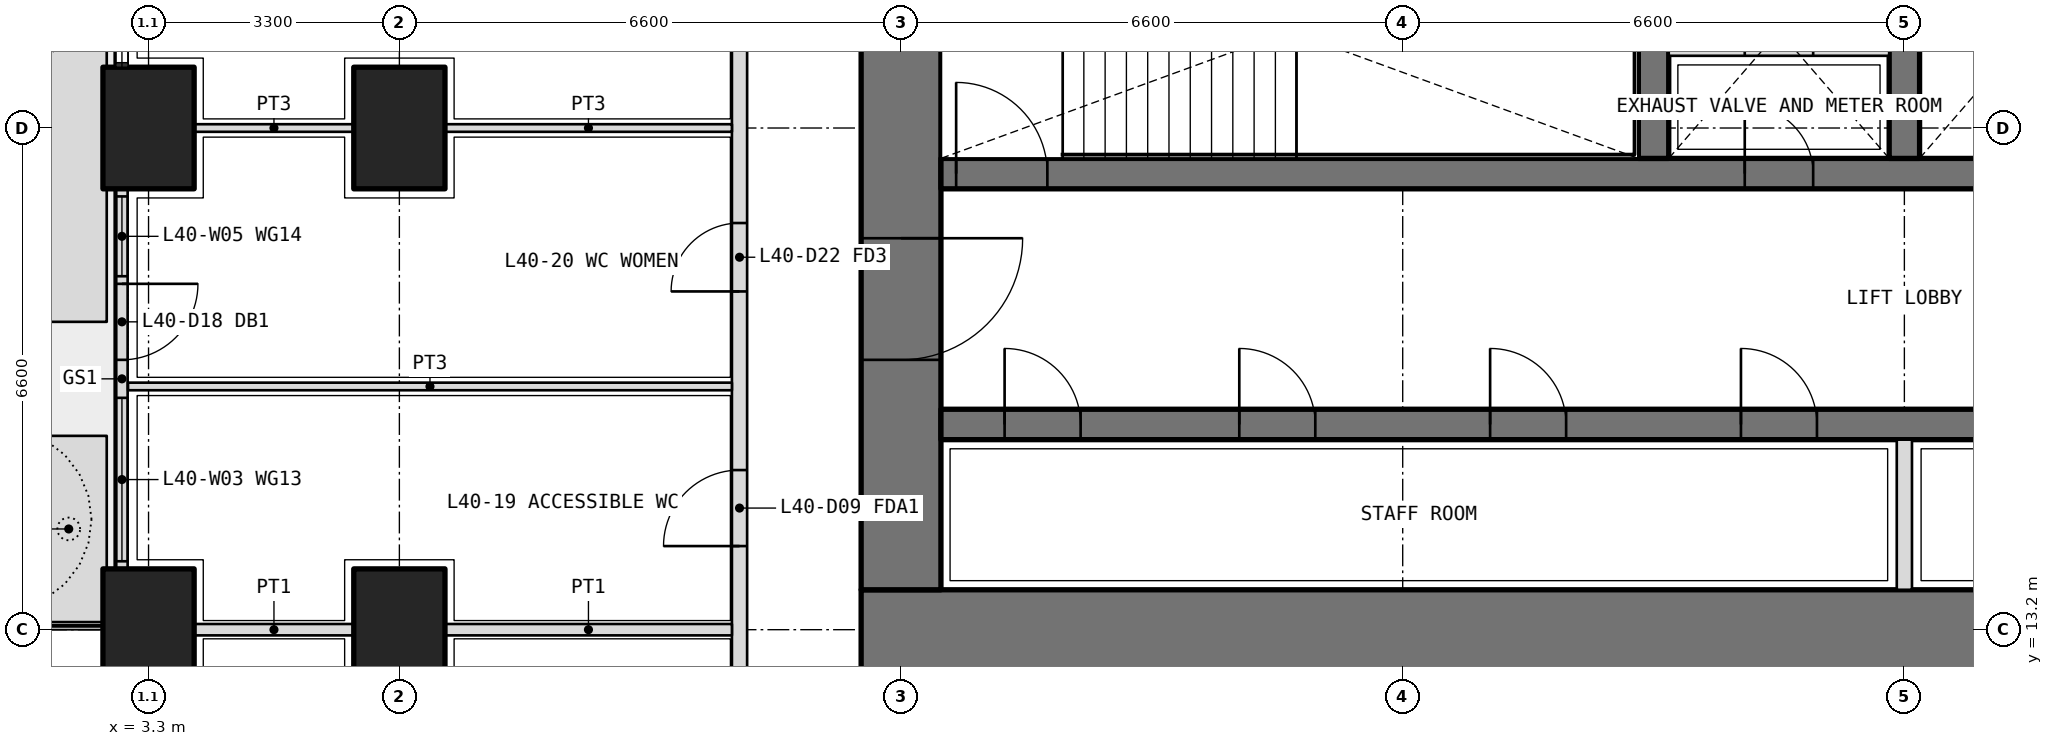
"""IFC4 building model, lengths in metres.
Left out: names, types, materials, properties, quantities, classifications, styles, units other than length and angle.
Written with IfcOpenShell. Run it as: python <this file> out.ifc"""

import sys

from ifc_helpers import new_model, si_unit, direction, frame, frame_2d, origin, origin_2d, place, context, subcontext, project, spatial, polyline, rectangle, outline, extrude, element, fill, save


model = new_model("IFC4")
c1 = context("Model", 3, precision=1e-05, world=origin(), true_north=direction((0.0, 1.0)))
c2 = subcontext(c1, "Body", "Model", "MODEL_VIEW")
j1 = project(units=[si_unit("LENGTHUNIT", "METRE"), si_unit("PLANEANGLEUNIT", "RADIAN")], contexts=[c1])
p1 = place(None, origin())
s1 = spatial("IfcSite", under=j1, at=p1, CompositionType="ELEMENT")
p2 = place(p1, origin())
s2 = spatial("IfcBuilding", under=s1, at=p2, CompositionType="ELEMENT")
p3 = place(p2, frame((0.0, 0.0, 176.7)))
s3 = spatial("IfcBuildingStorey", under=s2, at=p3, CompositionType="ELEMENT", Elevation=176.7)
for number, where, z_axis, x_axis in (
    (1, (3.3, 13.2, 0.0), (0.0, 0.0, 1.0), (0.0, 1.0, 0.0)),
    (2, (3.3, 19.8, 0.0), (0.0, 0.0, 1.0), (0.0, 1.0, 0.0)),
    (3, (6.6, 13.2, 0.0), (0.0, 0.0, 1.0), (0.0, 1.0, 0.0)),
    (4, (6.6, 19.8, 0.0), (0.0, 0.0, 1.0), (0.0, 1.0, 0.0)),
):
    element("IfcColumn", number, at=place(p3, frame(where, z_axis=z_axis, x_axis=x_axis)), inside=s3, PredefinedType="COLUMN", context=c2, shape_type="SweptSolid", body=[
        extrude(rectangle(XDim=1.6, YDim=1.2, at=origin_2d()), origin(), (0.0, 0.0, 1.0), 4.2),
    ])
p4 = place(p3, origin())
e5 = element("IfcWall", 5, at=p4, inside=s3, PredefinedType="USERDEFINED", context=c2, shape_type="SweptSolid", body=[
    extrude(outline(polyline([(1.75, 13.3), (2.75, 13.3), (2.75, 15.75), (1.75, 15.75), (1.75, 13.3)]), holes=[polyline([(1.9, 13.45), (2.6, 13.45), (2.6, 15.6), (1.9, 15.6), (1.9, 13.45)])]), origin(), (0.0, 0.0, 1.0), 1.05),
])
p5 = place(p3, origin())
e6 = element("IfcWall", 6, at=p5, inside=s3, PredefinedType="USERDEFINED", context=c2, shape_type="SweptSolid", body=[
    extrude(outline(polyline([(1.75, 17.25), (2.75, 17.25), (2.75, 26.3), (1.75, 26.3), (1.75, 17.25)]), holes=[polyline([(1.9, 17.4), (2.6, 17.4), (2.6, 26.15), (1.9, 26.15), (1.9, 17.4)])]), origin(), (0.0, 0.0, 1.0), 1.05),
])
p6 = place(p3, frame((2.95, 19.0, 0.0), z_axis=(0.0, 0.0, 1.0), x_axis=(0.0, -1.0, 0.0)))
e7 = element("IfcWall", 7, at=p6, inside=s3, PredefinedType="SOLIDWALL", context=c2, shape_type="SweptSolid", body=[
    extrude(rectangle(XDim=5.0, YDim=0.15, at=frame_2d((2.5, 0.0))), origin(), (0.0, 0.0, 1.0), 2.7),
])
p7 = place(p6, frame((1.25, 0.0, 0.0)))
e8 = element("IfcOpeningElement", 8, at=p7, cuts=e7, PredefinedType="OPENING", context=c2, shape_type="SweptSolid", body=[
    extrude(rectangle(XDim=1.0, YDim=2.4, at=frame_2d((0.5, 1.2))), frame((0.0, 0.085, 0.0), z_axis=(0.0, -1.0, 0.0), x_axis=(1.0, 0.0, 0.0)), (0.0, 0.0, 1.0), 0.17),
])
p8 = place(p6, frame((0.1, 0.0, 0.1)))
e9 = element("IfcOpeningElement", 9, at=p8, cuts=e7, PredefinedType="OPENING", context=c2, shape_type="SweptSolid", body=[
    extrude(rectangle(XDim=1.05, YDim=2.3, at=frame_2d((0.525, 1.15))), frame((0.0, 0.085, 0.0), z_axis=(0.0, -1.0, 0.0), x_axis=(1.0, 0.0, 0.0)), (0.0, 0.0, 1.0), 0.17),
])
p9 = place(p6, frame((2.75, 0.0, 0.1)))
e10 = element("IfcOpeningElement", 10, at=p9, cuts=e7, PredefinedType="OPENING", context=c2, shape_type="SweptSolid", body=[
    extrude(rectangle(XDim=2.15, YDim=2.3, at=frame_2d((1.075, 1.15))), frame((0.0, 0.085, 0.0), z_axis=(0.0, -1.0, 0.0), x_axis=(1.0, 0.0, 0.0)), (0.0, 0.0, 1.0), 0.17),
])
p10 = place(p3, frame((12.675, 13.2, 0.0), z_axis=(0.0, 0.0, 1.0), x_axis=(1.0, 0.0, 0.0)))
e11 = element("IfcWall", 11, at=p10, inside=s3, PredefinedType="SHEAR", context=c2, shape_type="SweptSolid", body=[
    extrude(rectangle(XDim=27.45, YDim=1.05, at=frame_2d((13.725, 0.0))), origin(), (0.0, 0.0, 1.0), 4.2),
])
p11 = place(p3, frame((13.2, 32.475, 0.0), z_axis=(0.0, 0.0, 1.0), x_axis=(0.0, -1.0, 0.0)))
e12 = element("IfcWall", 12, at=p11, inside=s3, PredefinedType="SHEAR", context=c2, shape_type="SweptSolid", body=[
    extrude(rectangle(XDim=18.75, YDim=1.05, at=frame_2d((9.375, 0.0))), origin(), (0.0, 0.0, 1.0), 4.2),
])
p12 = place(p11, frame((14.125, 0.0, 0.0)))
e13 = element("IfcOpeningElement", 13, at=p12, cuts=e12, PredefinedType="OPENING", context=c2, shape_type="SweptSolid", body=[
    extrude(rectangle(XDim=1.6, YDim=2.1, at=frame_2d((0.8, 1.05))), frame((0.0, 0.535, 0.0), z_axis=(0.0, -1.0, 0.0), x_axis=(1.0, 0.0, 0.0)), (0.0, 0.0, 1.0), 1.07),
])
p13 = place(p11, frame((3.325, 0.0, 0.0)))
e14 = element("IfcOpeningElement", 14, at=p13, cuts=e12, PredefinedType="OPENING", context=c2, shape_type="SweptSolid", body=[
    extrude(rectangle(XDim=1.6, YDim=2.1, at=frame_2d((0.8, 1.05))), frame((0.0, 0.535, 0.0), z_axis=(0.0, -1.0, 0.0), x_axis=(1.0, 0.0, 0.0)), (0.0, 0.0, 1.0), 1.07),
])
p14 = place(p3, frame((13.725, 15.9, 0.0), z_axis=(0.0, 0.0, 1.0), x_axis=(1.0, 0.0, 0.0)))
e15 = element("IfcWall", 15, at=p14, inside=s3, PredefinedType="SHEAR", context=c2, shape_type="SweptSolid", body=[
    extrude(rectangle(XDim=25.35, YDim=0.4, at=frame_2d((12.675, 0.0))), origin(), (0.0, 0.0, 1.0), 4.2),
])
p15 = place(p14, frame((0.837, 0.0, 0.0)))
e16 = element("IfcOpeningElement", 16, at=p15, cuts=e15, PredefinedType="OPENING", context=c2, shape_type="SweptSolid", body=[
    extrude(rectangle(XDim=1.0, YDim=2.1, at=frame_2d((0.5, 1.05))), frame((0.0, 0.21, 0.0), z_axis=(0.0, -1.0, 0.0), x_axis=(1.0, 0.0, 0.0)), (0.0, 0.0, 1.0), 0.42),
])
p16 = place(p14, frame((3.925, 0.0, 0.0)))
e17 = element("IfcOpeningElement", 17, at=p16, cuts=e15, PredefinedType="OPENING", context=c2, shape_type="SweptSolid", body=[
    extrude(rectangle(XDim=1.0, YDim=2.1, at=frame_2d((0.5, 1.05))), frame((0.0, 0.21, 0.0), z_axis=(0.0, -1.0, 0.0), x_axis=(1.0, 0.0, 0.0)), (0.0, 0.0, 1.0), 0.42),
])
p17 = place(p14, frame((7.225, 0.0, 0.0)))
e18 = element("IfcOpeningElement", 18, at=p17, cuts=e15, PredefinedType="OPENING", context=c2, shape_type="SweptSolid", body=[
    extrude(rectangle(XDim=1.0, YDim=2.1, at=frame_2d((0.5, 1.05))), frame((0.0, 0.21, 0.0), z_axis=(0.0, -1.0, 0.0), x_axis=(1.0, 0.0, 0.0)), (0.0, 0.0, 1.0), 0.42),
])
p18 = place(p14, frame((10.525, 0.0, 0.0)))
e19 = element("IfcOpeningElement", 19, at=p18, cuts=e15, PredefinedType="OPENING", context=c2, shape_type="SweptSolid", body=[
    extrude(rectangle(XDim=1.0, YDim=2.1, at=frame_2d((0.5, 1.05))), frame((0.0, 0.21, 0.0), z_axis=(0.0, -1.0, 0.0), x_axis=(1.0, 0.0, 0.0)), (0.0, 0.0, 1.0), 0.42),
])
p19 = place(p14, frame((13.825, 0.0, 0.0)))
e20 = element("IfcOpeningElement", 20, at=p19, cuts=e15, PredefinedType="OPENING", context=c2, shape_type="SweptSolid", body=[
    extrude(rectangle(XDim=1.0, YDim=2.1, at=frame_2d((0.5, 1.05))), frame((0.0, 0.21, 0.0), z_axis=(0.0, -1.0, 0.0), x_axis=(1.0, 0.0, 0.0)), (0.0, 0.0, 1.0), 0.42),
])
p20 = place(p14, frame((17.125, 0.0, 0.0)))
e21 = element("IfcOpeningElement", 21, at=p20, cuts=e15, PredefinedType="OPENING", context=c2, shape_type="SweptSolid", body=[
    extrude(rectangle(XDim=1.0, YDim=2.1, at=frame_2d((0.5, 1.05))), frame((0.0, 0.21, 0.0), z_axis=(0.0, -1.0, 0.0), x_axis=(1.0, 0.0, 0.0)), (0.0, 0.0, 1.0), 0.42),
])
p21 = place(p14, frame((20.425, 0.0, 0.0)))
e22 = element("IfcOpeningElement", 22, at=p21, cuts=e15, PredefinedType="OPENING", context=c2, shape_type="SweptSolid", body=[
    extrude(rectangle(XDim=1.0, YDim=2.1, at=frame_2d((0.5, 1.05))), frame((0.0, 0.21, 0.0), z_axis=(0.0, -1.0, 0.0), x_axis=(1.0, 0.0, 0.0)), (0.0, 0.0, 1.0), 0.42),
])
p22 = place(p14, frame((23.512, 0.0, 0.0)))
e23 = element("IfcOpeningElement", 23, at=p22, cuts=e15, PredefinedType="OPENING", context=c2, shape_type="SweptSolid", body=[
    extrude(rectangle(XDim=1.0, YDim=2.1, at=frame_2d((0.5, 1.05))), frame((0.0, 0.21, 0.0), z_axis=(0.0, -1.0, 0.0), x_axis=(1.0, 0.0, 0.0)), (0.0, 0.0, 1.0), 0.42),
])
p23 = place(p3, frame((13.725, 19.2, 0.0), z_axis=(0.0, 0.0, 1.0), x_axis=(1.0, 0.0, 0.0)))
e24 = element("IfcWall", 24, at=p23, inside=s3, PredefinedType="SHEAR", context=c2, shape_type="SweptSolid", body=[
    extrude(rectangle(XDim=25.35, YDim=0.4, at=frame_2d((12.675, 0.0))), origin(), (0.0, 0.0, 1.0), 4.2),
])
p24 = place(p23, frame((10.575, 0.0, 0.0)))
e25 = element("IfcOpeningElement", 25, at=p24, cuts=e24, PredefinedType="OPENING", context=c2, shape_type="SweptSolid", body=[
    extrude(rectangle(XDim=0.9, YDim=2.1, at=frame_2d((0.45, 1.05))), frame((0.0, 0.21, 0.0), z_axis=(0.0, -1.0, 0.0), x_axis=(1.0, 0.0, 0.0)), (0.0, 0.0, 1.0), 0.42),
])
p25 = place(p23, frame((13.875, 0.0, 0.0)))
e26 = element("IfcOpeningElement", 26, at=p25, cuts=e24, PredefinedType="OPENING", context=c2, shape_type="SweptSolid", body=[
    extrude(rectangle(XDim=0.9, YDim=2.1, at=frame_2d((0.45, 1.05))), frame((0.0, 0.21, 0.0), z_axis=(0.0, -1.0, 0.0), x_axis=(1.0, 0.0, 0.0)), (0.0, 0.0, 1.0), 0.42),
])
p26 = place(p23, frame((0.2, 0.0, 0.0)))
e27 = element("IfcOpeningElement", 27, at=p26, cuts=e24, PredefinedType="OPENING", context=c2, shape_type="SweptSolid", body=[
    extrude(rectangle(XDim=1.2, YDim=2.1, at=frame_2d((0.6, 1.05))), frame((0.0, 0.21, 0.0), z_axis=(0.0, -1.0, 0.0), x_axis=(1.0, 0.0, 0.0)), (0.0, 0.0, 1.0), 0.42),
])
p27 = place(p23, frame((23.512, 0.0, 0.0)))
e28 = element("IfcOpeningElement", 28, at=p27, cuts=e24, PredefinedType="OPENING", context=c2, shape_type="SweptSolid", body=[
    extrude(rectangle(XDim=1.1, YDim=2.1, at=frame_2d((0.55, 1.05))), frame((0.0, 0.21, 0.0), z_axis=(0.0, -1.0, 0.0), x_axis=(1.0, 0.0, 0.0)), (0.0, 0.0, 1.0), 0.42),
])
p28 = place(p23, frame((17.125, 0.0, 0.0)))
e29 = element("IfcOpeningElement", 29, at=p28, cuts=e24, PredefinedType="OPENING", context=c2, shape_type="SweptSolid", body=[
    extrude(rectangle(XDim=1.1, YDim=2.1, at=frame_2d((0.55, 1.05))), frame((0.0, 0.21, 0.0), z_axis=(0.0, -1.0, 0.0), x_axis=(1.0, 0.0, 0.0)), (0.0, 0.0, 1.0), 0.42),
])
p29 = place(p23, frame((20.325, 0.0, 0.0)))
e30 = element("IfcOpeningElement", 30, at=p29, cuts=e24, PredefinedType="OPENING", context=c2, shape_type="SweptSolid", body=[
    extrude(rectangle(XDim=1.1, YDim=2.1, at=frame_2d((0.55, 1.05))), frame((0.0, 0.21, 0.0), z_axis=(0.0, -1.0, 0.0), x_axis=(1.0, 0.0, 0.0)), (0.0, 0.0, 1.0), 0.42),
])
for number, where, z_axis, x_axis in (
    (31, (23.1, 19.4, 0.0), (0.0, 0.0, 1.0), (0.0, 1.0, 0.0)),
    (32, (26.4, 19.4, 0.0), (0.0, 0.0, 1.0), (0.0, 1.0, 0.0)),
):
    element("IfcWall", number, at=place(p3, frame(where, z_axis=z_axis, x_axis=x_axis)), inside=s3, PredefinedType="SHEAR", context=c2, shape_type="SweptSolid", body=[
        extrude(rectangle(XDim=3.35, YDim=0.4, at=frame_2d((1.675, 0.0))), origin(), (0.0, 0.0, 1.0), 4.2),
    ])
p30 = place(p3, frame((26.4, 13.725, 0.0), z_axis=(0.0, 0.0, 1.0), x_axis=(0.0, 1.0, 0.0)))
e33 = element("IfcWall", 33, at=p30, inside=s3, PredefinedType="PARTITIONING", context=c2, shape_type="SweptSolid", body=[
    extrude(rectangle(XDim=1.975, YDim=0.2, at=frame_2d((0.987, 0.0))), origin(), (0.0, 0.0, 1.0), 4.2),
])
p31 = place(p3, frame((11.075, 11.175, 0.0), z_axis=(0.0, 0.0, 1.0), x_axis=(0.0, 1.0, 0.0)))
e34 = element("IfcWall", 34, at=p31, inside=s3, PredefinedType="PARTITIONING", context=c2, shape_type="SweptSolid", body=[
    extrude(rectangle(XDim=23.85, YDim=0.2, at=frame_2d((11.925, 0.0))), origin(), (0.0, 0.0, 1.0), 2.85),
])
p32 = place(p31, frame((0.462, 0.0, 0.0)))
e35 = element("IfcOpeningElement", 35, at=p32, cuts=e34, PredefinedType="OPENING", context=c2, shape_type="SweptSolid", body=[
    extrude(rectangle(XDim=1.0, YDim=2.1, at=frame_2d((0.5, 1.05))), frame((0.0, 0.11, 0.0), z_axis=(0.0, -1.0, 0.0), x_axis=(1.0, 0.0, 0.0)), (0.0, 0.0, 1.0), 0.22),
])
p33 = place(p31, frame((3.125, 0.0, 0.0)))
e36 = element("IfcOpeningElement", 36, at=p33, cuts=e34, PredefinedType="OPENING", context=c2, shape_type="SweptSolid", body=[
    extrude(rectangle(XDim=1.0, YDim=2.1, at=frame_2d((0.5, 1.05))), frame((0.0, 0.11, 0.0), z_axis=(0.0, -1.0, 0.0), x_axis=(1.0, 0.0, 0.0)), (0.0, 0.0, 1.0), 0.22),
])
p34 = place(p31, frame((6.475, 0.0, 0.0)))
e37 = element("IfcOpeningElement", 37, at=p34, cuts=e34, PredefinedType="OPENING", context=c2, shape_type="SweptSolid", body=[
    extrude(rectangle(XDim=0.9, YDim=2.1, at=frame_2d((0.45, 1.05))), frame((0.0, 0.11, 0.0), z_axis=(0.0, -1.0, 0.0), x_axis=(1.0, 0.0, 0.0)), (0.0, 0.0, 1.0), 0.22),
])
p35 = place(p31, frame((9.675, 0.0, 0.0)))
e38 = element("IfcOpeningElement", 38, at=p35, cuts=e34, PredefinedType="OPENING", context=c2, shape_type="SweptSolid", body=[
    extrude(rectangle(XDim=0.9, YDim=2.1, at=frame_2d((0.45, 1.05))), frame((0.0, 0.11, 0.0), z_axis=(0.0, -1.0, 0.0), x_axis=(1.0, 0.0, 0.0)), (0.0, 0.0, 1.0), 0.22),
])
p36 = place(p31, frame((12.925, 0.0, 0.0)))
e39 = element("IfcOpeningElement", 39, at=p36, cuts=e34, PredefinedType="OPENING", context=c2, shape_type="SweptSolid", body=[
    extrude(rectangle(XDim=1.0, YDim=2.1, at=frame_2d((0.5, 1.05))), frame((0.0, 0.11, 0.0), z_axis=(0.0, -1.0, 0.0), x_axis=(1.0, 0.0, 0.0)), (0.0, 0.0, 1.0), 0.22),
])
p37 = place(p31, frame((19.087, 0.0, 0.0)))
e40 = element("IfcOpeningElement", 40, at=p37, cuts=e34, PredefinedType="OPENING", context=c2, shape_type="SweptSolid", body=[
    extrude(rectangle(XDim=1.0, YDim=2.1, at=frame_2d((0.5, 1.05))), frame((0.0, 0.11, 0.0), z_axis=(0.0, -1.0, 0.0), x_axis=(1.0, 0.0, 0.0)), (0.0, 0.0, 1.0), 0.22),
])
p38 = place(p3, frame((3.03, 16.4, 0.0), z_axis=(0.0, 0.0, 1.0), x_axis=(1.0, 0.0, 0.0)))
e41 = element("IfcWall", 41, at=p38, inside=s3, PredefinedType="PARTITIONING", context=c2, shape_type="SweptSolid", body=[
    extrude(rectangle(XDim=7.945, YDim=0.1, at=frame_2d((3.973, 0.0))), origin(), (0.0, 0.0, 1.0), 2.7),
])
p39 = place(p3, frame((3.9, 19.8, 0.0), z_axis=(0.0, 0.0, 1.0), x_axis=(1.0, 0.0, 0.0)))
e42 = element("IfcWall", 42, at=p39, inside=s3, PredefinedType="PARTITIONING", context=c2, shape_type="SweptSolid", body=[
    extrude(rectangle(XDim=2.1, YDim=0.1, at=frame_2d((1.05, 0.0))), origin(), (0.0, 0.0, 1.0), 2.85),
])
p40 = place(p3, frame((7.2, 19.8, 0.0), z_axis=(0.0, 0.0, 1.0), x_axis=(1.0, 0.0, 0.0)))
e43 = element("IfcWall", 43, at=p40, inside=s3, PredefinedType="PARTITIONING", context=c2, shape_type="SweptSolid", body=[
    extrude(rectangle(XDim=3.775, YDim=0.1, at=frame_2d((1.888, 0.0))), origin(), (0.0, 0.0, 1.0), 2.85),
])
p41 = place(p3, frame((3.9, 13.2, 0.0), z_axis=(0.0, 0.0, 1.0), x_axis=(1.0, 0.0, 0.0)))
e44 = element("IfcWall", 44, at=p41, inside=s3, PredefinedType="PARTITIONING", context=c2, shape_type="SweptSolid", body=[
    extrude(rectangle(XDim=2.1, YDim=0.15, at=frame_2d((1.05, 0.0))), origin(), (0.0, 0.0, 1.0), 2.85),
])
p42 = place(p3, frame((7.2, 13.2, 0.0), z_axis=(0.0, 0.0, 1.0), x_axis=(1.0, 0.0, 0.0)))
e45 = element("IfcWall", 45, at=p42, inside=s3, PredefinedType="PARTITIONING", context=c2, shape_type="SweptSolid", body=[
    extrude(rectangle(XDim=3.775, YDim=0.15, at=frame_2d((1.888, 0.0))), origin(), (0.0, 0.0, 1.0), 2.85),
])
p43 = place(p3, frame((23.3, 20.85, 0.0), z_axis=(0.0, 0.0, 1.0), x_axis=(1.0, 0.0, 0.0)))
e46 = element("IfcWall", 46, at=p43, inside=s3, PredefinedType="PARTITIONING", context=c2, shape_type="SweptSolid", body=[
    extrude(rectangle(XDim=2.9, YDim=0.2, at=frame_2d((1.45, 0.0))), origin(), (0.0, 0.0, 1.0), 3.9),
])
p44 = place(p43, frame((1.0, 0.0, 0.0)))
e47 = element("IfcOpeningElement", 47, at=p44, cuts=e46, PredefinedType="OPENING", context=c2, shape_type="SweptSolid", body=[
    extrude(rectangle(XDim=0.9, YDim=2.1, at=frame_2d((0.45, 1.05))), frame((0.0, 0.11, 0.0), z_axis=(0.0, -1.0, 0.0), x_axis=(1.0, 0.0, 0.0)), (0.0, 0.0, 1.0), 0.22),
])
p45 = place(p7, origin())
e48 = element("IfcDoor", 48, at=p45, inside=s3, OperationType="SINGLE_SWING_LEFT", PredefinedType="DOOR", context=c2, shape_type="SweptSolid", body=[
    extrude(rectangle(XDim=1.0, YDim=2.4, at=frame_2d((0.5, 1.2))), frame((0.0, 0.025, 0.0), z_axis=(0.0, -1.0, 0.0), x_axis=(1.0, 0.0, 0.0)), (0.0, 0.0, 1.0), 0.05),
])
fill(e8, e48)
p46 = place(p8, origin())
e49 = element("IfcWindow", 49, at=p46, inside=s3, PartitioningType="SINGLE_PANEL", PredefinedType="WINDOW", context=c2, shape_type="SweptSolid", body=[
    extrude(rectangle(XDim=1.05, YDim=2.3, at=frame_2d((0.525, 1.15))), frame((0.0, 0.03, 0.0), z_axis=(0.0, -1.0, 0.0), x_axis=(1.0, 0.0, 0.0)), (0.0, 0.0, 1.0), 0.06),
])
fill(e9, e49)
p47 = place(p9, origin())
e50 = element("IfcWindow", 50, at=p47, inside=s3, PartitioningType="SINGLE_PANEL", PredefinedType="WINDOW", context=c2, shape_type="SweptSolid", body=[
    extrude(rectangle(XDim=2.15, YDim=2.3, at=frame_2d((1.075, 1.15))), frame((0.0, 0.03, 0.0), z_axis=(0.0, -1.0, 0.0), x_axis=(1.0, 0.0, 0.0)), (0.0, 0.0, 1.0), 0.06),
])
fill(e10, e50)
p48 = place(p33, origin())
e51 = element("IfcDoor", 51, at=p48, inside=s3, OperationType="SINGLE_SWING_LEFT", PredefinedType="DOOR", context=c2, shape_type="SweptSolid", body=[
    extrude(rectangle(XDim=1.0, YDim=2.1, at=frame_2d((0.5, 1.05))), frame((0.0, 0.025, 0.0), z_axis=(0.0, -1.0, 0.0), x_axis=(1.0, 0.0, 0.0)), (0.0, 0.0, 1.0), 0.05),
])
fill(e36, e51)
p49 = place(p34, origin())
e52 = element("IfcDoor", 52, at=p49, inside=s3, OperationType="SINGLE_SWING_LEFT", PredefinedType="DOOR", context=c2, shape_type="SweptSolid", body=[
    extrude(rectangle(XDim=0.9, YDim=2.1, at=frame_2d((0.45, 1.05))), frame((0.0, 0.025, 0.0), z_axis=(0.0, -1.0, 0.0), x_axis=(1.0, 0.0, 0.0)), (0.0, 0.0, 1.0), 0.05),
])
fill(e37, e52)
p50 = place(p24, origin())
e53 = element("IfcDoor", 53, at=p50, inside=s3, OperationType="SINGLE_SWING_LEFT", PredefinedType="DOOR", context=c2, shape_type="SweptSolid", body=[
    extrude(rectangle(XDim=0.9, YDim=2.1, at=frame_2d((0.45, 1.05))), frame((0.0, 0.025, 0.0), z_axis=(0.0, -1.0, 0.0), x_axis=(1.0, 0.0, 0.0)), (0.0, 0.0, 1.0), 0.05),
])
fill(e25, e53)
p51 = place(p15, origin())
e54 = element("IfcDoor", 54, at=p51, inside=s3, OperationType="SINGLE_SWING_LEFT", PredefinedType="DOOR", context=c2, shape_type="SweptSolid", body=[
    extrude(rectangle(XDim=1.0, YDim=2.1, at=frame_2d((0.5, 1.05))), frame((0.0, 0.025, 0.0), z_axis=(0.0, -1.0, 0.0), x_axis=(1.0, 0.0, 0.0)), (0.0, 0.0, 1.0), 0.05),
])
fill(e16, e54)
p52 = place(p16, origin())
e55 = element("IfcDoor", 55, at=p52, inside=s3, OperationType="SINGLE_SWING_LEFT", PredefinedType="DOOR", context=c2, shape_type="SweptSolid", body=[
    extrude(rectangle(XDim=1.0, YDim=2.1, at=frame_2d((0.5, 1.05))), frame((0.0, 0.025, 0.0), z_axis=(0.0, -1.0, 0.0), x_axis=(1.0, 0.0, 0.0)), (0.0, 0.0, 1.0), 0.05),
])
fill(e17, e55)
p53 = place(p17, origin())
e56 = element("IfcDoor", 56, at=p53, inside=s3, OperationType="SINGLE_SWING_LEFT", PredefinedType="DOOR", context=c2, shape_type="SweptSolid", body=[
    extrude(rectangle(XDim=1.0, YDim=2.1, at=frame_2d((0.5, 1.05))), frame((0.0, 0.025, 0.0), z_axis=(0.0, -1.0, 0.0), x_axis=(1.0, 0.0, 0.0)), (0.0, 0.0, 1.0), 0.05),
])
fill(e18, e56)
p54 = place(p18, origin())
e57 = element("IfcDoor", 57, at=p54, inside=s3, OperationType="SINGLE_SWING_LEFT", PredefinedType="DOOR", context=c2, shape_type="SweptSolid", body=[
    extrude(rectangle(XDim=1.0, YDim=2.1, at=frame_2d((0.5, 1.05))), frame((0.0, 0.025, 0.0), z_axis=(0.0, -1.0, 0.0), x_axis=(1.0, 0.0, 0.0)), (0.0, 0.0, 1.0), 0.05),
])
fill(e19, e57)
p55 = place(p26, origin())
e58 = element("IfcDoor", 58, at=p55, inside=s3, OperationType="SINGLE_SWING_LEFT", PredefinedType="DOOR", context=c2, shape_type="SweptSolid", body=[
    extrude(rectangle(XDim=1.2, YDim=2.1, at=frame_2d((0.6, 1.05))), frame((0.0, 0.025, 0.0), z_axis=(0.0, -1.0, 0.0), x_axis=(1.0, 0.0, 0.0)), (0.0, 0.0, 1.0), 0.05),
])
fill(e27, e58)
p56 = place(p12, origin())
e59 = element("IfcDoor", 59, at=p56, inside=s3, OperationType="DOUBLE_DOOR_DOUBLE_SWING", PredefinedType="DOOR", context=c2, shape_type="SweptSolid", body=[
    extrude(rectangle(XDim=1.6, YDim=2.1, at=frame_2d((0.8, 1.05))), frame((0.0, 0.025, 0.0), z_axis=(0.0, -1.0, 0.0), x_axis=(1.0, 0.0, 0.0)), (0.0, 0.0, 1.0), 0.05),
])
fill(e13, e59)
save(model, sys.argv[1])
